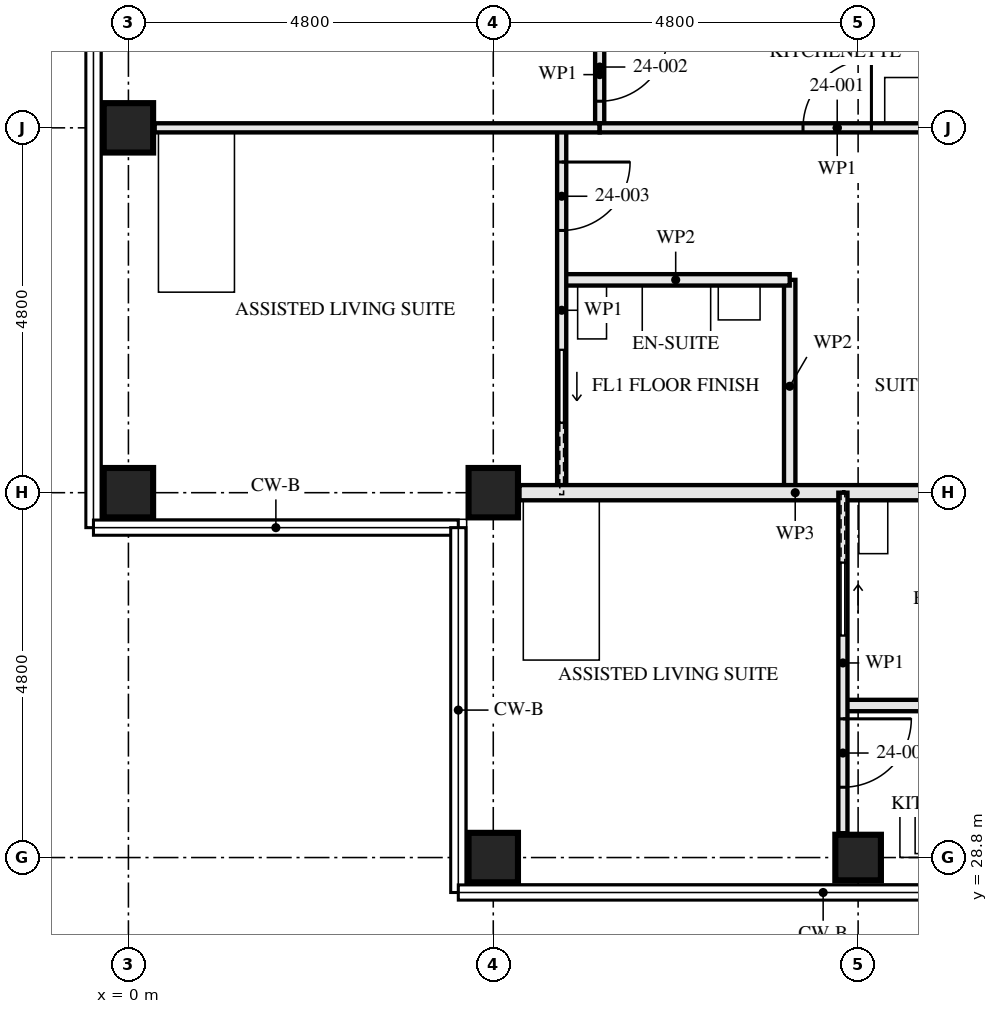
"""IFC4 building model, lengths in metres.
Left out: names, types, materials, properties, quantities, classifications, styles, units other than length and angle.
Written with IfcOpenShell. Run it as: python <this file> out.ifc"""

import sys

from ifc_helpers import new_model, si_unit, direction, frame, frame_2d, origin, origin_2d, place, context, subcontext, project, spatial, rectangle, hollow_rectangle, extrude, element, fill, save


model = new_model("IFC4")
c1 = context("Model", 3, precision=1e-05, world=origin(), true_north=direction((0.0, 1.0)))
c2 = subcontext(c1, "Body", "Model", "MODEL_VIEW")
j1 = project(units=[si_unit("LENGTHUNIT", "METRE"), si_unit("PLANEANGLEUNIT", "RADIAN")], contexts=[c1])
p1 = place(None, origin())
s1 = spatial("IfcSite", under=j1, at=p1, CompositionType="ELEMENT")
p2 = place(p1, origin())
s2 = spatial("IfcBuilding", under=s1, at=p2, CompositionType="ELEMENT")
p3 = place(p2, frame((0.0, 0.0, 91.0)))
s3 = spatial("IfcBuildingStorey", under=s2, at=p3, CompositionType="ELEMENT", Elevation=91.0)
for number, where, z_axis, x_axis in (
    (1, (0.0, 33.6, 0.0), (0.0, 0.0, 1.0), (0.0, 1.0, 0.0)),
    (2, (0.0, 38.4, 0.0), (0.0, 0.0, 1.0), (1.0, 0.0, 0.0)),
    (3, (4.8, 28.8, 0.0), (0.0, 0.0, 1.0), (0.0, 1.0, 0.0)),
    (4, (4.8, 33.6, 0.0), (0.0, 0.0, 1.0), (0.0, 1.0, 0.0)),
):
    element("IfcColumn", number, at=place(p3, frame(where, z_axis=z_axis, x_axis=x_axis)), inside=s3, PredefinedType="COLUMN", context=c2, shape_type="SweptSolid", body=[
        extrude(hollow_rectangle(XDim=0.65, YDim=0.65, WallThickness=0.08, at=origin_2d()), origin(), (0.0, 0.0, 1.0), 3.5),
    ])
p4 = place(p3, frame((9.6, 28.8, 0.0), z_axis=(0.0, 0.0, 1.0), x_axis=(0.0, 1.0, 0.0)))
e5 = element("IfcColumn", 5, at=p4, inside=s3, PredefinedType="COLUMN", context=c2, shape_type="SweptSolid", body=[
    extrude(hollow_rectangle(XDim=0.6, YDim=0.6, WallThickness=0.08, at=origin_2d()), origin(), (0.0, 0.0, 1.0), 3.5),
])
p5 = place(p3, frame((5.7, 36.4, 0.0), z_axis=(0.0, 0.0, 1.0), x_axis=(1.0, 0.0, 0.0)))
e6 = element("IfcWall", 6, at=p5, inside=s3, PredefinedType="PARTITIONING", context=c2, shape_type="SweptSolid", body=[
    extrude(rectangle(XDim=3.0, YDim=0.15, at=frame_2d((1.5, 0.0))), origin(), (0.0, 0.0, 1.0), 3.33),
])
p6 = place(p3, frame((8.7, 36.4, 0.0), z_axis=(0.0, 0.0, 1.0), x_axis=(0.0, -1.0, 0.0)))
e7 = element("IfcWall", 7, at=p6, inside=s3, PredefinedType="PARTITIONING", context=c2, shape_type="SweptSolid", body=[
    extrude(rectangle(XDim=2.8, YDim=0.15, at=frame_2d((1.4, 0.0))), origin(), (0.0, 0.0, 1.0), 3.33),
])
p7 = place(p3, frame((6.2, 38.4, 0.0), z_axis=(0.0, 0.0, 1.0), x_axis=(1.0, 0.0, 0.0)))
e8 = element("IfcWall", 8, at=p7, inside=s3, PredefinedType="PARTITIONING", context=c2, shape_type="SweptSolid", body=[
    extrude(rectangle(XDim=6.25, YDim=0.12, at=frame_2d((3.125, 0.0))), origin(), (0.0, 0.0, 1.0), 2.55),
])
p8 = place(p7, frame((2.675, 0.0, 0.0)))
e9 = element("IfcOpeningElement", 9, at=p8, cuts=e8, PredefinedType="OPENING", context=c2, shape_type="SweptSolid", body=[
    extrude(rectangle(XDim=0.9, YDim=2.1, at=frame_2d((0.45, 1.05))), frame((0.0, 0.071, 0.0), z_axis=(0.0, -1.0, 0.0), x_axis=(1.0, 0.0, 0.0)), (0.0, 0.0, 1.0), 0.141),
])
p9 = place(p3, frame((6.2, 39.8, 0.0), z_axis=(0.0, 0.0, 1.0), x_axis=(0.0, -1.0, 0.0)))
e10 = element("IfcWall", 10, at=p9, inside=s3, PredefinedType="PARTITIONING", context=c2, shape_type="SweptSolid", body=[
    extrude(rectangle(XDim=1.4, YDim=0.12, at=frame_2d((0.7, 0.0))), origin(), (0.0, 0.0, 1.0), 3.33),
])
p10 = place(p9, frame((0.15, 0.0, 0.0)))
e11 = element("IfcOpeningElement", 11, at=p10, cuts=e10, PredefinedType="OPENING", context=c2, shape_type="SweptSolid", body=[
    extrude(rectangle(XDim=0.9, YDim=2.1, at=frame_2d((0.45, 1.05))), frame((0.0, 0.071, 0.0), z_axis=(0.0, -1.0, 0.0), x_axis=(1.0, 0.0, 0.0)), (0.0, 0.0, 1.0), 0.141),
])
p11 = place(p3, frame((5.7, 38.4, 0.0), z_axis=(0.0, 0.0, 1.0), x_axis=(0.0, -1.0, 0.0)))
e12 = element("IfcWall", 12, at=p11, inside=s3, PredefinedType="PARTITIONING", context=c2, shape_type="SweptSolid", body=[
    extrude(rectangle(XDim=4.8, YDim=0.12, at=frame_2d((2.4, 0.0))), origin(), (0.0, 0.0, 1.0), 3.33),
])
p12 = place(p11, frame((0.45, 0.0, 0.0)))
e13 = element("IfcOpeningElement", 13, at=p12, cuts=e12, PredefinedType="OPENING", context=c2, shape_type="SweptSolid", body=[
    extrude(rectangle(XDim=0.9, YDim=2.1, at=frame_2d((0.45, 1.05))), frame((0.0, 0.071, 0.0), z_axis=(0.0, -1.0, 0.0), x_axis=(1.0, 0.0, 0.0)), (0.0, 0.0, 1.0), 0.141),
])
p13 = place(p11, frame((2.925, 0.0, 0.0)))
e14 = element("IfcOpeningElement", 14, at=p13, cuts=e12, PredefinedType="OPENING", context=c2, shape_type="SweptSolid", body=[
    extrude(rectangle(XDim=0.95, YDim=2.1, at=frame_2d((0.475, 1.05))), frame((0.0, 0.071, 0.0), z_axis=(0.0, -1.0, 0.0), x_axis=(1.0, 0.0, 0.0)), (0.0, 0.0, 1.0), 0.141),
])
p14 = place(p3, frame((0.345, 38.4, 0.0), z_axis=(0.0, 0.0, 1.0), x_axis=(1.0, 0.0, 0.0)))
e15 = element("IfcWall", 15, at=p14, inside=s3, PredefinedType="PARTITIONING", context=c2, shape_type="SweptSolid", body=[
    extrude(rectangle(XDim=5.855, YDim=0.12, at=frame_2d((2.927, 0.0))), origin(), (0.0, 0.0, 1.0), 2.55),
])
p15 = place(p3, frame((5.145, 33.6, 0.0), z_axis=(0.0, 0.0, 1.0), x_axis=(1.0, 0.0, 0.0)))
e16 = element("IfcWall", 16, at=p15, inside=s3, PredefinedType="PARTITIONING", context=c2, shape_type="SweptSolid", body=[
    extrude(rectangle(XDim=7.255, YDim=0.2, at=frame_2d((3.627, 0.0))), origin(), (0.0, 0.0, 1.0), 2.55),
])
p16 = place(p3, frame((9.4, 30.8, 0.0), z_axis=(0.0, 0.0, 1.0), x_axis=(1.0, 0.0, 0.0)))
e17 = element("IfcWall", 17, at=p16, inside=s3, PredefinedType="PARTITIONING", context=c2, shape_type="SweptSolid", body=[
    extrude(rectangle(XDim=3.0, YDim=0.15, at=frame_2d((1.5, 0.0))), origin(), (0.0, 0.0, 1.0), 3.33),
])
p17 = place(p3, frame((9.4, 33.6, 0.0), z_axis=(0.0, 0.0, 1.0), x_axis=(0.0, -1.0, 0.0)))
e18 = element("IfcWall", 18, at=p17, inside=s3, PredefinedType="PARTITIONING", context=c2, shape_type="SweptSolid", body=[
    extrude(rectangle(XDim=4.48, YDim=0.12, at=frame_2d((2.24, 0.0))), origin(), (0.0, 0.0, 1.0), 3.33),
])
p18 = place(p17, frame((2.975, 0.0, 0.0)))
e19 = element("IfcOpeningElement", 19, at=p18, cuts=e18, PredefinedType="OPENING", context=c2, shape_type="SweptSolid", body=[
    extrude(rectangle(XDim=0.9, YDim=2.1, at=frame_2d((0.45, 1.05))), frame((0.0, 0.071, 0.0), z_axis=(0.0, -1.0, 0.0), x_axis=(1.0, 0.0, 0.0)), (0.0, 0.0, 1.0), 0.141),
])
p19 = place(p17, frame((0.925, 0.0, 0.0)))
e20 = element("IfcOpeningElement", 20, at=p19, cuts=e18, PredefinedType="OPENING", context=c2, shape_type="SweptSolid", body=[
    extrude(rectangle(XDim=0.95, YDim=2.1, at=frame_2d((0.475, 1.05))), frame((0.0, 0.071, 0.0), z_axis=(0.0, -1.0, 0.0), x_axis=(1.0, 0.0, 0.0)), (0.0, 0.0, 1.0), 0.141),
])
p20 = place(p8, origin())
e21 = element("IfcDoor", 21, at=p20, inside=s3, OperationType="SINGLE_SWING_LEFT", PredefinedType="DOOR", context=c2, shape_type="SweptSolid", body=[
    extrude(rectangle(XDim=0.9, YDim=2.1, at=frame_2d((0.45, 1.05))), frame((0.0, 0.022, 0.0), z_axis=(0.0, -1.0, 0.0), x_axis=(1.0, 0.0, 0.0)), (0.0, 0.0, 1.0), 0.044),
])
fill(e9, e21)
p21 = place(p10, origin())
e22 = element("IfcDoor", 22, at=p21, inside=s3, OperationType="SINGLE_SWING_RIGHT", PredefinedType="DOOR", context=c2, shape_type="SweptSolid", body=[
    extrude(rectangle(XDim=0.9, YDim=2.1, at=frame_2d((0.45, 1.05))), frame((0.0, 0.022, 0.0), z_axis=(0.0, -1.0, 0.0), x_axis=(1.0, 0.0, 0.0)), (0.0, 0.0, 1.0), 0.044),
])
fill(e11, e22)
p22 = place(p12, origin())
e23 = element("IfcDoor", 23, at=p22, inside=s3, OperationType="SINGLE_SWING_RIGHT", PredefinedType="DOOR", context=c2, shape_type="SweptSolid", body=[
    extrude(rectangle(XDim=0.9, YDim=2.1, at=frame_2d((0.45, 1.05))), frame((0.0, 0.022, 0.0), z_axis=(0.0, -1.0, 0.0), x_axis=(1.0, 0.0, 0.0)), (0.0, 0.0, 1.0), 0.044),
])
fill(e13, e23)
p23 = place(p13, origin())
e24 = element("IfcDoor", 24, at=p23, inside=s3, OperationType="SLIDING_TO_LEFT", PredefinedType="DOOR", context=c2, shape_type="SweptSolid", body=[
    extrude(rectangle(XDim=0.95, YDim=2.1, at=frame_2d((0.475, 1.05))), frame((0.0, 0.022, 0.0), z_axis=(0.0, -1.0, 0.0), x_axis=(1.0, 0.0, 0.0)), (0.0, 0.0, 1.0), 0.044),
])
fill(e14, e24)
p24 = place(p18, origin())
e25 = element("IfcDoor", 25, at=p24, inside=s3, OperationType="SINGLE_SWING_RIGHT", PredefinedType="DOOR", context=c2, shape_type="SweptSolid", body=[
    extrude(rectangle(XDim=0.9, YDim=2.1, at=frame_2d((0.45, 1.05))), frame((0.0, 0.022, 0.0), z_axis=(0.0, -1.0, 0.0), x_axis=(1.0, 0.0, 0.0)), (0.0, 0.0, 1.0), 0.044),
])
fill(e19, e25)
p25 = place(p19, origin())
e26 = element("IfcDoor", 26, at=p25, inside=s3, OperationType="SLIDING_TO_RIGHT", PredefinedType="DOOR", context=c2, shape_type="SweptSolid", body=[
    extrude(rectangle(XDim=0.95, YDim=2.1, at=frame_2d((0.475, 1.05))), frame((0.0, 0.022, 0.0), z_axis=(0.0, -1.0, 0.0), x_axis=(1.0, 0.0, 0.0)), (0.0, 0.0, 1.0), 0.044),
])
fill(e20, e26)
save(model, sys.argv[1])
